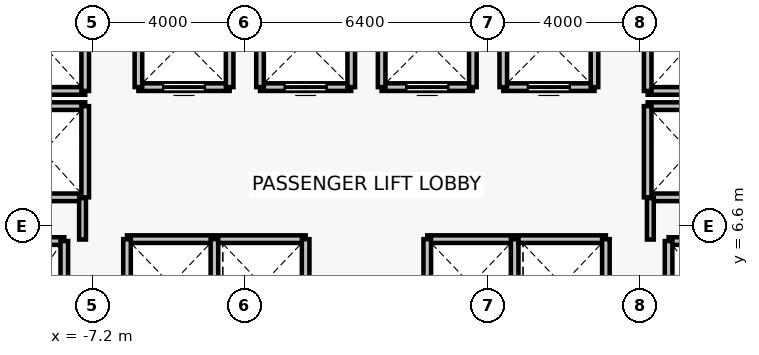
"""IFC4 building model, lengths in metres.
Left out: names, types, materials, properties, quantities, classifications, styles, units other than length and angle.
Written with IfcOpenShell. Run it as: python <this file> out.ifc"""

import sys

from ifc_helpers import new_model, si_unit, direction, frame, frame_2d, origin, place, context, subcontext, project, spatial, rectangle, extrude, source, transform, mapped, element, fill, save


model = new_model("IFC4")
c1 = context("Model", 3, precision=1e-05, world=origin(), true_north=direction((0.0, 1.0)))
c2 = subcontext(c1, "Body", "Model", "MODEL_VIEW")
j1 = project(units=[si_unit("LENGTHUNIT", "METRE"), si_unit("PLANEANGLEUNIT", "RADIAN")], contexts=[c1])
p1 = place(None, origin())
s1 = spatial("IfcSite", under=j1, at=p1, CompositionType="ELEMENT")
p2 = place(p1, origin())
s2 = spatial("IfcBuilding", under=s1, at=p2, CompositionType="ELEMENT")
p3 = place(p2, frame((0.0, 0.0, 9.4)))
s3 = spatial("IfcBuildingStorey", under=s2, at=p3, CompositionType="ELEMENT", Elevation=9.4)
p4 = place(p3, frame((-9.95, 6.2, 0.0), z_axis=(0.0, 0.0, 1.0), x_axis=(1.0, 0.0, 0.0)))
e1 = element("IfcWall", 1, at=p4, inside=s3, PredefinedType="SOLIDWALL", context=c2, shape_type="SweptSolid", body=[
    extrude(rectangle(XDim=2.0, YDim=0.2, at=frame_2d((1.0, 0.0))), origin(), (0.0, 0.0, 1.0), 4.1),
])
p5 = place(p3, frame((-7.95, 6.2, 0.0), z_axis=(0.0, 0.0, 1.0), x_axis=(0.0, -1.0, 0.0)))
e2 = element("IfcWall", 2, at=p5, inside=s3, PredefinedType="SOLIDWALL", context=c2, shape_type="SweptSolid", body=[
    extrude(rectangle(XDim=2.8, YDim=0.2, at=frame_2d((1.4, 0.0))), origin(), (0.0, 0.0, 1.0), 4.1),
])
p6 = place(p3, frame((7.95, 6.2, 0.0), z_axis=(0.0, 0.0, 1.0), x_axis=(1.0, 0.0, 0.0)))
e3 = element("IfcWall", 3, at=p6, inside=s3, PredefinedType="SOLIDWALL", context=c2, shape_type="SweptSolid", body=[
    extrude(rectangle(XDim=2.0, YDim=0.2, at=frame_2d((1.0, 0.0))), origin(), (0.0, 0.0, 1.0), 4.1),
])
p7 = place(p3, frame((7.95, 3.4, 0.0), z_axis=(0.0, 0.0, 1.0), x_axis=(0.0, 1.0, 0.0)))
e4 = element("IfcWall", 4, at=p7, inside=s3, PredefinedType="SOLIDWALL", context=c2, shape_type="SweptSolid", body=[
    extrude(rectangle(XDim=2.8, YDim=0.2, at=frame_2d((1.4, 0.0))), origin(), (0.0, 0.0, 1.0), 4.1),
])
p8 = place(p3, frame((-3.6, 10.25, 0.0), z_axis=(0.0, 0.0, 1.0), x_axis=(-1.0, 0.0, 0.0)))
e5 = element("IfcWall", 5, at=p8, inside=s3, PredefinedType="SOLIDWALL", context=c2, shape_type="SweptSolid", body=[
    extrude(rectangle(XDim=2.4, YDim=0.2, at=frame_2d((1.2, 0.0))), origin(), (0.0, 0.0, 1.0), 4.1),
])
p9 = place(p8, frame((0.65, 0.0, 0.0)))
e6 = element("IfcOpeningElement", 6, at=p9, cuts=e5, PredefinedType="OPENING", context=c2, shape_type="SweptSolid", body=[
    extrude(rectangle(XDim=1.1, YDim=2.2, at=frame_2d((0.55, 1.1))), frame((0.0, 0.11, 0.0), z_axis=(0.0, -1.0, 0.0), x_axis=(1.0, 0.0, 0.0)), (0.0, 0.0, 1.0), 0.22),
])
for number, where, z_axis, x_axis in (
    (7, (-6.0, 10.25, 0.0), (0.0, 0.0, 1.0), (0.0, 1.0, 0.0)),
    (8, (-3.6, 12.65, 0.0), (0.0, 0.0, 1.0), (0.0, -1.0, 0.0)),
):
    element("IfcWall", number, at=place(p3, frame(where, z_axis=z_axis, x_axis=x_axis)), inside=s3, PredefinedType="SOLIDWALL", context=c2, shape_type="SweptSolid", body=[
        extrude(rectangle(XDim=2.4, YDim=0.2, at=frame_2d((1.2, 0.0))), origin(), (0.0, 0.0, 1.0), 4.1),
    ])
p10 = place(p3, frame((-0.4, 10.25, 0.0), z_axis=(0.0, 0.0, 1.0), x_axis=(-1.0, 0.0, 0.0)))
e9 = element("IfcWall", 9, at=p10, inside=s3, PredefinedType="SOLIDWALL", context=c2, shape_type="SweptSolid", body=[
    extrude(rectangle(XDim=2.4, YDim=0.2, at=frame_2d((1.2, 0.0))), origin(), (0.0, 0.0, 1.0), 4.1),
])
p11 = place(p10, frame((0.65, 0.0, 0.0)))
e10 = element("IfcOpeningElement", 10, at=p11, cuts=e9, PredefinedType="OPENING", context=c2, shape_type="SweptSolid", body=[
    extrude(rectangle(XDim=1.1, YDim=2.2, at=frame_2d((0.55, 1.1))), frame((0.0, 0.11, 0.0), z_axis=(0.0, -1.0, 0.0), x_axis=(1.0, 0.0, 0.0)), (0.0, 0.0, 1.0), 0.22),
])
for number, where, z_axis, x_axis in (
    (11, (-2.8, 10.25, 0.0), (0.0, 0.0, 1.0), (0.0, 1.0, 0.0)),
    (12, (-0.4, 12.65, 0.0), (0.0, 0.0, 1.0), (0.0, -1.0, 0.0)),
):
    element("IfcWall", number, at=place(p3, frame(where, z_axis=z_axis, x_axis=x_axis)), inside=s3, PredefinedType="SOLIDWALL", context=c2, shape_type="SweptSolid", body=[
        extrude(rectangle(XDim=2.4, YDim=0.2, at=frame_2d((1.2, 0.0))), origin(), (0.0, 0.0, 1.0), 4.1),
    ])
p12 = place(p3, frame((2.8, 10.25, 0.0), z_axis=(0.0, 0.0, 1.0), x_axis=(-1.0, 0.0, 0.0)))
e13 = element("IfcWall", 13, at=p12, inside=s3, PredefinedType="SOLIDWALL", context=c2, shape_type="SweptSolid", body=[
    extrude(rectangle(XDim=2.4, YDim=0.2, at=frame_2d((1.2, 0.0))), origin(), (0.0, 0.0, 1.0), 4.1),
])
p13 = place(p12, frame((0.65, 0.0, 0.0)))
e14 = element("IfcOpeningElement", 14, at=p13, cuts=e13, PredefinedType="OPENING", context=c2, shape_type="SweptSolid", body=[
    extrude(rectangle(XDim=1.1, YDim=2.2, at=frame_2d((0.55, 1.1))), frame((0.0, 0.11, 0.0), z_axis=(0.0, -1.0, 0.0), x_axis=(1.0, 0.0, 0.0)), (0.0, 0.0, 1.0), 0.22),
])
for number, where, z_axis, x_axis in (
    (15, (0.4, 10.25, 0.0), (0.0, 0.0, 1.0), (0.0, 1.0, 0.0)),
    (16, (2.8, 12.65, 0.0), (0.0, 0.0, 1.0), (0.0, -1.0, 0.0)),
):
    element("IfcWall", number, at=place(p3, frame(where, z_axis=z_axis, x_axis=x_axis)), inside=s3, PredefinedType="SOLIDWALL", context=c2, shape_type="SweptSolid", body=[
        extrude(rectangle(XDim=2.4, YDim=0.2, at=frame_2d((1.2, 0.0))), origin(), (0.0, 0.0, 1.0), 4.1),
    ])
p14 = place(p3, frame((6.0, 10.25, 0.0), z_axis=(0.0, 0.0, 1.0), x_axis=(-1.0, 0.0, 0.0)))
e17 = element("IfcWall", 17, at=p14, inside=s3, PredefinedType="SOLIDWALL", context=c2, shape_type="SweptSolid", body=[
    extrude(rectangle(XDim=2.4, YDim=0.2, at=frame_2d((1.2, 0.0))), origin(), (0.0, 0.0, 1.0), 4.1),
])
p15 = place(p14, frame((0.65, 0.0, 0.0)))
e18 = element("IfcOpeningElement", 18, at=p15, cuts=e17, PredefinedType="OPENING", context=c2, shape_type="SweptSolid", body=[
    extrude(rectangle(XDim=1.1, YDim=2.2, at=frame_2d((0.55, 1.1))), frame((0.0, 0.11, 0.0), z_axis=(0.0, -1.0, 0.0), x_axis=(1.0, 0.0, 0.0)), (0.0, 0.0, 1.0), 0.22),
])
for number, where, z_axis, x_axis in (
    (19, (3.6, 10.25, 0.0), (0.0, 0.0, 1.0), (0.0, 1.0, 0.0)),
    (20, (6.0, 12.65, 0.0), (0.0, 0.0, 1.0), (0.0, -1.0, 0.0)),
):
    element("IfcWall", number, at=place(p3, frame(where, z_axis=z_axis, x_axis=x_axis)), inside=s3, PredefinedType="SOLIDWALL", context=c2, shape_type="SweptSolid", body=[
        extrude(rectangle(XDim=2.4, YDim=0.2, at=frame_2d((1.2, 0.0))), origin(), (0.0, 0.0, 1.0), 4.1),
    ])
p16 = place(p3, frame((-6.3, 6.25, 0.0), z_axis=(0.0, 0.0, 1.0), x_axis=(1.0, 0.0, 0.0)))
e21 = element("IfcWall", 21, at=p16, inside=s3, PredefinedType="SOLIDWALL", context=c2, shape_type="SweptSolid", body=[
    extrude(rectangle(XDim=2.3, YDim=0.2, at=frame_2d((1.15, 0.0))), origin(), (0.0, 0.0, 1.0), 4.1),
])
for number, where, z_axis, x_axis in (
    (22, (-6.3, 3.85, 0.0), (0.0, 0.0, 1.0), (0.0, 1.0, 0.0)),
    (23, (-4.0, 6.25, 0.0), (0.0, 0.0, 1.0), (0.0, -1.0, 0.0)),
):
    element("IfcWall", number, at=place(p3, frame(where, z_axis=z_axis, x_axis=x_axis)), inside=s3, PredefinedType="SOLIDWALL", context=c2, shape_type="SweptSolid", body=[
        extrude(rectangle(XDim=2.4, YDim=0.2, at=frame_2d((1.2, 0.0))), origin(), (0.0, 0.0, 1.0), 4.1),
    ])
p17 = place(p3, frame((-3.9, 6.25, 0.0), z_axis=(0.0, 0.0, 1.0), x_axis=(1.0, 0.0, 0.0)))
e24 = element("IfcWall", 24, at=p17, inside=s3, PredefinedType="SOLIDWALL", context=c2, shape_type="SweptSolid", body=[
    extrude(rectangle(XDim=2.3, YDim=0.2, at=frame_2d((1.15, 0.0))), origin(), (0.0, 0.0, 1.0), 4.1),
])
p18 = place(p3, frame((-1.6, 6.25, 0.0), z_axis=(0.0, 0.0, 1.0), x_axis=(0.0, -1.0, 0.0)))
e25 = element("IfcWall", 25, at=p18, inside=s3, PredefinedType="SOLIDWALL", context=c2, shape_type="SweptSolid", body=[
    extrude(rectangle(XDim=2.4, YDim=0.2, at=frame_2d((1.2, 0.0))), origin(), (0.0, 0.0, 1.0), 4.1),
])
p19 = place(p3, frame((1.6, 6.25, 0.0), z_axis=(0.0, 0.0, 1.0), x_axis=(1.0, 0.0, 0.0)))
e26 = element("IfcWall", 26, at=p19, inside=s3, PredefinedType="SOLIDWALL", context=c2, shape_type="SweptSolid", body=[
    extrude(rectangle(XDim=2.3, YDim=0.2, at=frame_2d((1.15, 0.0))), origin(), (0.0, 0.0, 1.0), 4.1),
])
for number, where, z_axis, x_axis in (
    (27, (1.6, 3.85, 0.0), (0.0, 0.0, 1.0), (0.0, 1.0, 0.0)),
    (28, (3.9, 6.25, 0.0), (0.0, 0.0, 1.0), (0.0, -1.0, 0.0)),
):
    element("IfcWall", number, at=place(p3, frame(where, z_axis=z_axis, x_axis=x_axis)), inside=s3, PredefinedType="SOLIDWALL", context=c2, shape_type="SweptSolid", body=[
        extrude(rectangle(XDim=2.4, YDim=0.2, at=frame_2d((1.2, 0.0))), origin(), (0.0, 0.0, 1.0), 4.1),
    ])
p20 = place(p3, frame((4.0, 6.25, 0.0), z_axis=(0.0, 0.0, 1.0), x_axis=(1.0, 0.0, 0.0)))
e29 = element("IfcWall", 29, at=p20, inside=s3, PredefinedType="SOLIDWALL", context=c2, shape_type="SweptSolid", body=[
    extrude(rectangle(XDim=2.3, YDim=0.2, at=frame_2d((1.15, 0.0))), origin(), (0.0, 0.0, 1.0), 4.1),
])
p21 = place(p3, frame((6.3, 6.25, 0.0), z_axis=(0.0, 0.0, 1.0), x_axis=(0.0, -1.0, 0.0)))
e30 = element("IfcWall", 30, at=p21, inside=s3, PredefinedType="SOLIDWALL", context=c2, shape_type="SweptSolid", body=[
    extrude(rectangle(XDim=2.4, YDim=0.2, at=frame_2d((1.2, 0.0))), origin(), (0.0, 0.0, 1.0), 4.1),
])
for number, where, z_axis, x_axis in (
    (31, (-7.4, 7.35, 0.0), (0.0, 0.0, 1.0), (-1.0, 0.0, 0.0)),
    (32, (-9.6, 9.75, 0.0), (0.0, 0.0, 1.0), (1.0, 0.0, 0.0)),
):
    element("IfcWall", number, at=place(p3, frame(where, z_axis=z_axis, x_axis=x_axis)), inside=s3, PredefinedType="SOLIDWALL", context=c2, shape_type="SweptSolid", body=[
        extrude(rectangle(XDim=2.2, YDim=0.2, at=frame_2d((1.1, 0.0))), origin(), (0.0, 0.0, 1.0), 3.19),
    ])
p22 = place(p3, frame((-7.4, 9.75, 0.0), z_axis=(0.0, 0.0, 1.0), x_axis=(0.0, -1.0, 0.0)))
e33 = element("IfcWall", 33, at=p22, inside=s3, PredefinedType="SOLIDWALL", context=c2, shape_type="SweptSolid", body=[
    extrude(rectangle(XDim=2.4, YDim=0.2, at=frame_2d((1.2, 0.0))), origin(), (0.0, 0.0, 1.0), 3.19),
])
p23 = place(p3, frame((-7.4, 10.15, 0.0), z_axis=(0.0, 0.0, 1.0), x_axis=(-1.0, 0.0, 0.0)))
e34 = element("IfcWall", 34, at=p23, inside=s3, PredefinedType="SOLIDWALL", context=c2, shape_type="SweptSolid", body=[
    extrude(rectangle(XDim=2.2, YDim=0.2, at=frame_2d((1.1, 0.0))), origin(), (0.0, 0.0, 1.0), 3.19),
])
p24 = place(p3, frame((-7.4, 12.55, 0.0), z_axis=(0.0, 0.0, 1.0), x_axis=(0.0, -1.0, 0.0)))
e35 = element("IfcWall", 35, at=p24, inside=s3, PredefinedType="SOLIDWALL", context=c2, shape_type="SweptSolid", body=[
    extrude(rectangle(XDim=2.4, YDim=0.2, at=frame_2d((1.2, 0.0))), origin(), (0.0, 0.0, 1.0), 3.19),
])
for number, where, z_axis, x_axis in (
    (36, (9.6, 7.35, 0.0), (0.0, 0.0, 1.0), (-1.0, 0.0, 0.0)),
    (37, (7.4, 9.75, 0.0), (0.0, 0.0, 1.0), (1.0, 0.0, 0.0)),
):
    element("IfcWall", number, at=place(p3, frame(where, z_axis=z_axis, x_axis=x_axis)), inside=s3, PredefinedType="SOLIDWALL", context=c2, shape_type="SweptSolid", body=[
        extrude(rectangle(XDim=2.2, YDim=0.2, at=frame_2d((1.1, 0.0))), origin(), (0.0, 0.0, 1.0), 3.19),
    ])
p25 = place(p3, frame((7.4, 7.35, 0.0), z_axis=(0.0, 0.0, 1.0), x_axis=(0.0, 1.0, 0.0)))
e38 = element("IfcWall", 38, at=p25, inside=s3, PredefinedType="SOLIDWALL", context=c2, shape_type="SweptSolid", body=[
    extrude(rectangle(XDim=2.4, YDim=0.2, at=frame_2d((1.2, 0.0))), origin(), (0.0, 0.0, 1.0), 3.19),
])
p26 = place(p3, frame((9.6, 10.15, 0.0), z_axis=(0.0, 0.0, 1.0), x_axis=(-1.0, 0.0, 0.0)))
e39 = element("IfcWall", 39, at=p26, inside=s3, PredefinedType="SOLIDWALL", context=c2, shape_type="SweptSolid", body=[
    extrude(rectangle(XDim=2.2, YDim=0.2, at=frame_2d((1.1, 0.0))), origin(), (0.0, 0.0, 1.0), 3.19),
])
p27 = place(p3, frame((7.4, 10.15, 0.0), z_axis=(0.0, 0.0, 1.0), x_axis=(0.0, 1.0, 0.0)))
e40 = element("IfcWall", 40, at=p27, inside=s3, PredefinedType="SOLIDWALL", context=c2, shape_type="SweptSolid", body=[
    extrude(rectangle(XDim=2.4, YDim=0.2, at=frame_2d((1.2, 0.0))), origin(), (0.0, 0.0, 1.0), 3.19),
])
for number, where, z_axis, x_axis in (
    (41, (-7.47, 7.33, 0.0), (0.0, 0.0, 1.0), (0.0, -1.0, 0.0)),
    (42, (7.47, 6.24, 0.0), (0.0, 0.0, 1.0), (0.0, 1.0, 0.0)),
):
    element("IfcWall", number, at=place(p3, frame(where, z_axis=z_axis, x_axis=x_axis)), inside=s3, PredefinedType="PARTITIONING", context=c2, shape_type="SweptSolid", body=[
        extrude(rectangle(XDim=1.09, YDim=0.18, at=frame_2d((0.545, 0.0))), origin(), (0.0, 0.0, 1.0), 3.19),
    ])
m1 = source(origin(), c2, "Body", "SweptSolid", [
    extrude(rectangle(XDim=1.1, YDim=2.2, at=frame_2d((0.55, 1.1))), frame((0.0, 0.025, 0.0), z_axis=(0.0, -1.0, 0.0), x_axis=(1.0, 0.0, 0.0)), (0.0, 0.0, 1.0), 0.05),
])
p28 = place(p9, origin())
e43 = element("IfcDoor", 43, at=p28, inside=s3, OperationType="DOUBLE_DOOR_SLIDING", PredefinedType="DOOR", context=c2, shape_type="MappedRepresentation", body=[
    mapped(m1, transform((0.0, 0.0, 0.0), x_axis=(1.0, 0.0, 0.0), y_axis=(0.0, 1.0, 0.0), z_axis=(0.0, 0.0, 1.0), scale=1.0)),
])
fill(e6, e43)
p29 = place(p11, origin())
e44 = element("IfcDoor", 44, at=p29, inside=s3, OperationType="DOUBLE_DOOR_SLIDING", PredefinedType="DOOR", context=c2, shape_type="MappedRepresentation", body=[
    mapped(m1, transform((0.0, 0.0, 0.0), x_axis=(1.0, 0.0, 0.0), y_axis=(0.0, 1.0, 0.0), z_axis=(0.0, 0.0, 1.0), scale=1.0)),
])
fill(e10, e44)
p30 = place(p13, origin())
e45 = element("IfcDoor", 45, at=p30, inside=s3, OperationType="DOUBLE_DOOR_SLIDING", PredefinedType="DOOR", context=c2, shape_type="MappedRepresentation", body=[
    mapped(m1, transform((0.0, 0.0, 0.0), x_axis=(1.0, 0.0, 0.0), y_axis=(0.0, 1.0, 0.0), z_axis=(0.0, 0.0, 1.0), scale=1.0)),
])
fill(e14, e45)
p31 = place(p15, origin())
e46 = element("IfcDoor", 46, at=p31, inside=s3, OperationType="DOUBLE_DOOR_SLIDING", PredefinedType="DOOR", context=c2, shape_type="MappedRepresentation", body=[
    mapped(m1, transform((0.0, 0.0, 0.0), x_axis=(1.0, 0.0, 0.0), y_axis=(0.0, 1.0, 0.0), z_axis=(0.0, 0.0, 1.0), scale=1.0)),
])
fill(e18, e46)
save(model, sys.argv[1])
